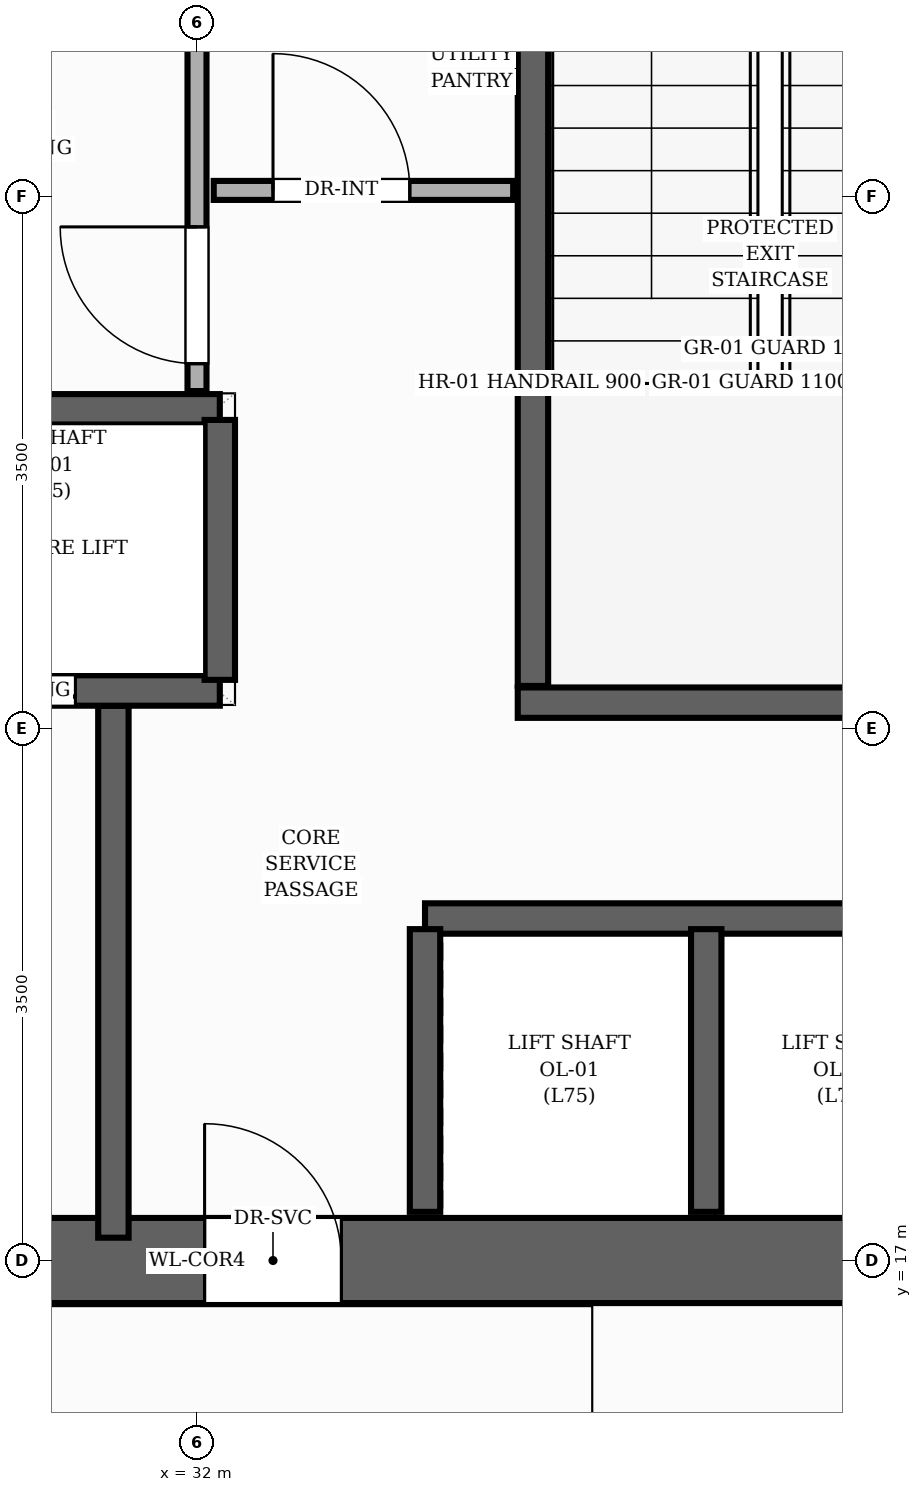
"""IFC4 building model, lengths in metres.
Left out: names, types, materials, properties, quantities, classifications, styles, units other than length and angle.
Written with IfcOpenShell. Run it as: python <this file> out.ifc"""

import sys

from ifc_helpers import new_model, si_unit, direction, frame, frame_2d, origin, place, context, subcontext, project, spatial, rectangle, extrude, element, fill, save


model = new_model("IFC4")
c1 = context("Model", 3, precision=1e-05, world=origin(), true_north=direction((0.0, 1.0)))
c2 = subcontext(c1, "Body", "Model", "MODEL_VIEW")
j1 = project(units=[si_unit("LENGTHUNIT", "METRE"), si_unit("PLANEANGLEUNIT", "RADIAN")], contexts=[c1])
p1 = place(None, origin())
s1 = spatial("IfcSite", under=j1, at=p1, CompositionType="ELEMENT")
p2 = place(p1, origin())
s2 = spatial("IfcBuilding", under=s1, at=p2, CompositionType="ELEMENT")
p3 = place(p2, frame((0.0, 0.0, 251.04)))
s3 = spatial("IfcBuildingStorey", under=s2, at=p3, CompositionType="ELEMENT", Elevation=251.04)
p4 = place(p3, frame((26.22, 17.0, 0.0), z_axis=(0.0, 0.0, 1.0), x_axis=(1.0, 0.0, 0.0)))
e1 = element("IfcWall", 1, at=p4, inside=s3, PredefinedType="SHEAR", context=c2, shape_type="SweptSolid", body=[
    extrude(rectangle(XDim=11.56, YDim=0.56, at=frame_2d((5.78, 0.0))), origin(), (0.0, 0.0, 1.0), 4.16),
])
p5 = place(p4, frame((2.28, 0.0, 0.0)))
e2 = element("IfcOpeningElement", 2, at=p5, cuts=e1, PredefinedType="OPENING", context=c2, shape_type="SweptSolid", body=[
    extrude(rectangle(XDim=1.1, YDim=2.15, at=frame_2d((0.55, 1.075))), frame((0.0, 0.29, 0.0), z_axis=(0.0, -1.0, 0.0), x_axis=(1.0, 0.0, 0.0)), (0.0, 0.0, 1.0), 0.58),
])
p6 = place(p4, frame((5.83, 0.0, 0.0)))
e3 = element("IfcOpeningElement", 3, at=p6, cuts=e1, PredefinedType="OPENING", context=c2, shape_type="SweptSolid", body=[
    extrude(rectangle(XDim=0.9, YDim=2.1, at=frame_2d((0.45, 1.05))), frame((0.0, 0.29, 0.0), z_axis=(0.0, -1.0, 0.0), x_axis=(1.0, 0.0, 0.0)), (0.0, 0.0, 1.0), 0.58),
])
p7 = place(p3, frame((34.21, 20.78, 0.0), z_axis=(0.0, 0.0, 1.0), x_axis=(0.0, 1.0, 0.0)))
e4 = element("IfcWall", 4, at=p7, inside=s3, PredefinedType="SHEAR", context=c2, shape_type="SweptSolid", body=[
    extrude(rectangle(XDim=6.44, YDim=0.2, at=frame_2d((3.22, 0.0))), origin(), (0.0, 0.0, 1.0), 4.16),
])
p8 = place(p3, frame((34.11, 20.67, 0.0), z_axis=(0.0, 0.0, 1.0), x_axis=(1.0, 0.0, 0.0)))
e5 = element("IfcWall", 5, at=p8, inside=s3, PredefinedType="SHEAR", context=c2, shape_type="SweptSolid", body=[
    extrude(rectangle(XDim=3.24, YDim=0.2, at=frame_2d((1.62, 0.0))), origin(), (0.0, 0.0, 1.0), 4.16),
])
p9 = place(p3, frame((31.45, 17.15, 0.0), z_axis=(0.0, 0.0, 1.0), x_axis=(0.0, 1.0, 0.0)))
e6 = element("IfcWall", 6, at=p9, inside=s3, PredefinedType="SHEAR", context=c2, shape_type="SweptSolid", body=[
    extrude(rectangle(XDim=3.5, YDim=0.2, at=frame_2d((1.75, 0.0))), origin(), (0.0, 0.0, 1.0), 4.16),
])
p10 = place(p3, frame((29.85, 20.75, 0.0), z_axis=(0.0, 0.0, 1.0), x_axis=(1.0, 0.0, 0.0)))
e7 = element("IfcWall", 7, at=p10, inside=s3, PredefinedType="SHEAR", context=c2, shape_type="SweptSolid", body=[
    extrude(rectangle(XDim=2.3, YDim=0.2, at=frame_2d((1.15, 0.0))), origin(), (0.0, 0.0, 1.0), 4.16),
])
p11 = place(p10, frame((0.25, 0.0, 0.0)))
e8 = element("IfcOpeningElement", 8, at=p11, cuts=e7, PredefinedType="OPENING", context=c2, shape_type="SweptSolid", body=[
    extrude(rectangle(XDim=1.1, YDim=2.15, at=frame_2d((0.55, 1.075))), frame((0.0, 0.11, 0.0), z_axis=(0.0, -1.0, 0.0), x_axis=(1.0, 0.0, 0.0)), (0.0, 0.0, 1.0), 0.22),
])
p12 = place(p3, frame((29.85, 22.6, 0.0), z_axis=(0.0, 0.0, 1.0), x_axis=(1.0, 0.0, 0.0)))
e9 = element("IfcWall", 9, at=p12, inside=s3, PredefinedType="SHEAR", context=c2, shape_type="SweptSolid", body=[
    extrude(rectangle(XDim=2.3, YDim=0.2, at=frame_2d((1.15, 0.0))), origin(), (0.0, 0.0, 1.0), 4.16),
])
p13 = place(p3, frame((32.15, 20.82, 0.0), z_axis=(0.0, 0.0, 1.0), x_axis=(0.0, 1.0, 0.0)))
e10 = element("IfcWall", 10, at=p13, inside=s3, PredefinedType="SHEAR", context=c2, shape_type="SweptSolid", body=[
    extrude(rectangle(XDim=1.71, YDim=0.2, at=frame_2d((0.855, 0.0))), origin(), (0.0, 0.0, 1.0), 4.16),
])
p14 = place(p3, frame((33.5, 19.25, 0.0), z_axis=(0.0, 0.0, 1.0), x_axis=(1.0, 0.0, 0.0)))
e11 = element("IfcWall", 11, at=p14, inside=s3, PredefinedType="SHEAR", context=c2, shape_type="SweptSolid", body=[
    extrude(rectangle(XDim=3.72, YDim=0.2, at=frame_2d((1.86, 0.0))), origin(), (0.0, 0.0, 1.0), 4.16),
])
for number, where, z_axis, x_axis in (
    (12, (33.5, 17.32, 0.0), (0.0, 0.0, 1.0), (0.0, 1.0, 0.0)),
    (13, (35.35, 17.32, 0.0), (0.0, 0.0, 1.0), (0.0, 1.0, 0.0)),
):
    element("IfcWall", number, at=place(p3, frame(where, z_axis=z_axis, x_axis=x_axis)), inside=s3, PredefinedType="SHEAR", context=c2, shape_type="SweptSolid", body=[
        extrude(rectangle(XDim=1.86, YDim=0.2, at=frame_2d((0.93, 0.0))), origin(), (0.0, 0.0, 1.0), 4.16),
    ])
p15 = place(p3, frame((32.0, 22.72, 0.0), z_axis=(0.0, 0.0, 1.0), x_axis=(0.0, 1.0, 0.0)))
e14 = element("IfcWall", 14, at=p15, inside=s3, PredefinedType="PARTITIONING", context=c2, shape_type="SweptSolid", body=[
    extrude(rectangle(XDim=2.52, YDim=0.125, at=frame_2d((1.26, 0.0))), origin(), (0.0, 0.0, 1.0), 3.905),
])
p16 = place(p15, frame((0.18, 0.0, 0.0)))
e15 = element("IfcOpeningElement", 15, at=p16, cuts=e14, PredefinedType="OPENING", context=c2, shape_type="SweptSolid", body=[
    extrude(rectangle(XDim=0.9, YDim=2.1, at=frame_2d((0.45, 1.05))), frame((0.0, 0.073, 0.0), z_axis=(0.0, -1.0, 0.0), x_axis=(1.0, 0.0, 0.0)), (0.0, 0.0, 1.0), 0.145),
])
p17 = place(p3, frame((32.11, 24.04, 0.0), z_axis=(0.0, 0.0, 1.0), x_axis=(1.0, 0.0, 0.0)))
e16 = element("IfcWall", 16, at=p17, inside=s3, PredefinedType="PARTITIONING", context=c2, shape_type="SweptSolid", body=[
    extrude(rectangle(XDim=1.97, YDim=0.125, at=frame_2d((0.985, 0.0))), origin(), (0.0, 0.0, 1.0), 3.905),
])
p18 = place(p17, frame((0.39, 0.0, 0.0)))
e17 = element("IfcOpeningElement", 17, at=p18, cuts=e16, PredefinedType="OPENING", context=c2, shape_type="SweptSolid", body=[
    extrude(rectangle(XDim=0.9, YDim=2.1, at=frame_2d((0.45, 1.05))), frame((0.0, 0.073, 0.0), z_axis=(0.0, -1.0, 0.0), x_axis=(1.0, 0.0, 0.0)), (0.0, 0.0, 1.0), 0.145),
])
p19 = place(p11, origin())
e18 = element("IfcDoor", 18, at=p19, inside=s3, OperationType="DOUBLE_DOOR_SLIDING", PredefinedType="DOOR", context=c2, shape_type="SweptSolid", body=[
    extrude(rectangle(XDim=1.1, YDim=2.15, at=frame_2d((0.55, 1.075))), frame((0.0, 0.025, 0.0), z_axis=(0.0, -1.0, 0.0), x_axis=(1.0, 0.0, 0.0)), (0.0, 0.0, 1.0), 0.05),
])
fill(e8, e18)
p20 = place(p6, origin())
e19 = element("IfcDoor", 19, at=p20, inside=s3, OperationType="SINGLE_SWING_LEFT", PredefinedType="DOOR", context=c2, shape_type="SweptSolid", body=[
    extrude(rectangle(XDim=0.9, YDim=2.1, at=frame_2d((0.45, 1.05))), frame((0.0, 0.025, 0.0), z_axis=(0.0, -1.0, 0.0), x_axis=(1.0, 0.0, 0.0)), (0.0, 0.0, 1.0), 0.05),
])
fill(e3, e19)
p21 = place(p18, origin())
e20 = element("IfcDoor", 20, at=p21, inside=s3, OperationType="SINGLE_SWING_LEFT", PredefinedType="DOOR", context=c2, shape_type="SweptSolid", body=[
    extrude(rectangle(XDim=0.9, YDim=2.1, at=frame_2d((0.45, 1.05))), frame((0.0, 0.025, 0.0), z_axis=(0.0, -1.0, 0.0), x_axis=(1.0, 0.0, 0.0)), (0.0, 0.0, 1.0), 0.05),
])
fill(e17, e20)
p22 = place(p16, origin())
e21 = element("IfcDoor", 21, at=p22, inside=s3, OperationType="SINGLE_SWING_RIGHT", PredefinedType="DOOR", context=c2, shape_type="SweptSolid", body=[
    extrude(rectangle(XDim=0.9, YDim=2.1, at=frame_2d((0.45, 1.05))), frame((0.0, 0.025, 0.0), z_axis=(0.0, -1.0, 0.0), x_axis=(1.0, 0.0, 0.0)), (0.0, 0.0, 1.0), 0.05),
])
fill(e15, e21)
save(model, sys.argv[1])
